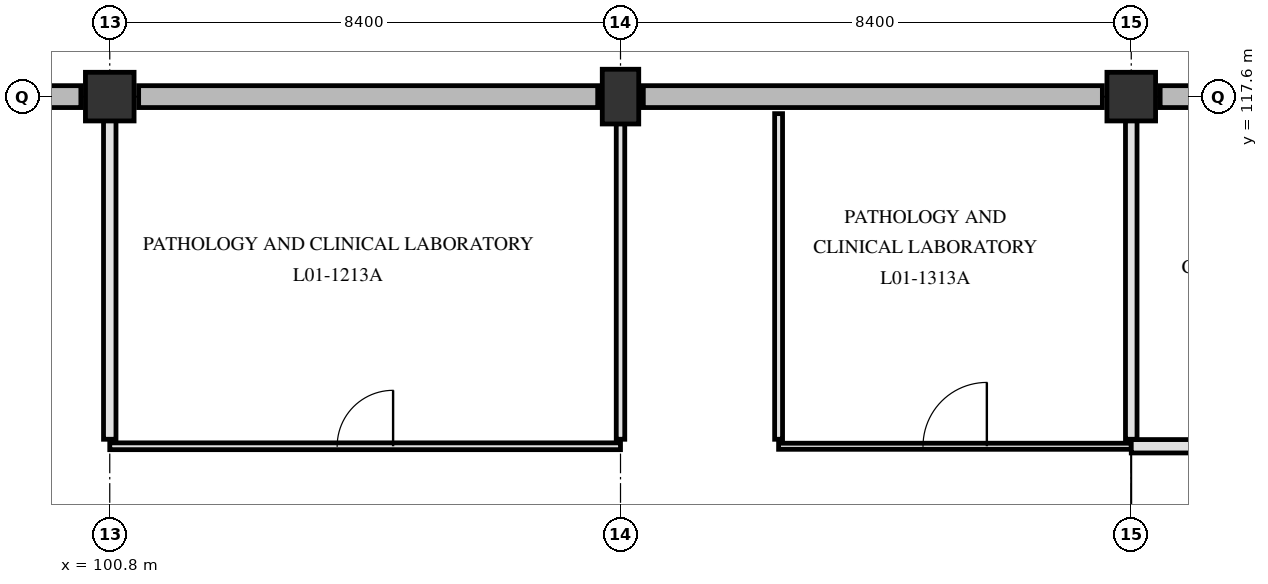
"""IFC4 building model, lengths in metres.
Left out: names, types, materials, properties, quantities, classifications, styles, units other than length and angle.
Written with IfcOpenShell. Run it as: python <this file> out.ifc"""

import sys

from ifc_helpers import new_model, si_unit, direction, frame, frame_2d, origin, origin_2d, place, context, subcontext, project, spatial, rectangle, extrude, element, fill, save


model = new_model("IFC4")
c1 = context("Model", 3, precision=1e-05, world=origin(), true_north=direction((0.0, 1.0)))
c2 = subcontext(c1, "Body", "Model", "MODEL_VIEW")
j1 = project(units=[si_unit("LENGTHUNIT", "METRE"), si_unit("PLANEANGLEUNIT", "RADIAN")], contexts=[c1])
p1 = place(None, origin())
s1 = spatial("IfcSite", under=j1, at=p1, CompositionType="ELEMENT")
p2 = place(p1, origin())
s2 = spatial("IfcBuilding", under=s1, at=p2, CompositionType="ELEMENT")
p3 = place(p2, frame((0.0, 0.0, 4.8)))
s3 = spatial("IfcBuildingStorey", under=s2, at=p3, CompositionType="ELEMENT", Elevation=4.8)
p4 = place(p3, frame((100.8, 117.6, 0.0), z_axis=(0.0, 0.0, 1.0), x_axis=(1.0, 0.0, 0.0)))
e1 = element("IfcColumn", 1, at=p4, inside=s3, PredefinedType="COLUMN", context=c2, shape_type="SweptSolid", body=[
    extrude(rectangle(XDim=0.8, YDim=0.8, at=origin_2d()), origin(), (0.0, 0.0, 1.0), 4.5),
])
p5 = place(p3, frame((109.2, 117.6, 0.0), z_axis=(0.0, 0.0, 1.0), x_axis=(1.0, 0.0, 0.0)))
e2 = element("IfcColumn", 2, at=p5, inside=s3, PredefinedType="PILASTER", context=c2, shape_type="SweptSolid", body=[
    extrude(rectangle(XDim=0.6, YDim=0.9, at=origin_2d()), origin(), (0.0, 0.0, 1.0), 4.5),
])
p6 = place(p3, frame((117.6, 117.6, 0.0), z_axis=(0.0, 0.0, 1.0), x_axis=(1.0, 0.0, 0.0)))
e3 = element("IfcColumn", 3, at=p6, inside=s3, PredefinedType="COLUMN", context=c2, shape_type="SweptSolid", body=[
    extrude(rectangle(XDim=0.8, YDim=0.8, at=origin_2d()), origin(), (0.0, 0.0, 1.0), 4.5),
])
p7 = place(p3, frame((92.875, 117.6, 0.0), z_axis=(0.0, 0.0, 1.0), x_axis=(1.0, 0.0, 0.0)))
e4 = element("IfcWall", 4, at=p7, inside=s3, PredefinedType="SOLIDWALL", context=c2, shape_type="SweptSolid", body=[
    extrude(rectangle(XDim=7.45, YDim=0.36, at=frame_2d((3.725, 0.0))), origin(), (0.0, 0.0, 1.0), 4.15),
])
for number, where, z_axis, x_axis in (
    (5, (101.275, 117.6, 0.0), (0.0, 0.0, 1.0), (1.0, 0.0, 0.0)),
    (6, (109.575, 117.6, 0.0), (0.0, 0.0, 1.0), (1.0, 0.0, 0.0)),
):
    element("IfcWall", number, at=place(p3, frame(where, z_axis=z_axis, x_axis=x_axis)), inside=s3, PredefinedType="SOLIDWALL", context=c2, shape_type="SweptSolid", body=[
        extrude(rectangle(XDim=7.55, YDim=0.36, at=frame_2d((3.775, 0.0))), origin(), (0.0, 0.0, 1.0), 4.15),
    ])
p8 = place(p3, frame((118.075, 117.6, 0.0), z_axis=(0.0, 0.0, 1.0), x_axis=(1.0, 0.0, 0.0)))
e7 = element("IfcWall", 7, at=p8, inside=s3, PredefinedType="SOLIDWALL", context=c2, shape_type="SweptSolid", body=[
    extrude(rectangle(XDim=7.45, YDim=0.36, at=frame_2d((3.725, 0.0))), origin(), (0.0, 0.0, 1.0), 4.15),
])
p9 = place(p3, frame((100.8, 111.85, 0.0), z_axis=(0.0, 0.0, 1.0), x_axis=(1.0, 0.0, 0.0)))
e8 = element("IfcWall", 8, at=p9, inside=s3, PredefinedType="PARTITIONING", context=c2, shape_type="SweptSolid", body=[
    extrude(rectangle(XDim=8.4, YDim=0.112, at=frame_2d((4.2, 0.0))), origin(), (0.0, 0.0, 1.0), 3.59),
])
p10 = place(p9, frame((3.74, 0.0, 0.0)))
e9 = element("IfcOpeningElement", 9, at=p10, cuts=e8, PredefinedType="OPENING", context=c2, shape_type="SweptSolid", body=[
    extrude(rectangle(XDim=0.92, YDim=2.08, at=frame_2d((0.46, 1.04))), frame((0.0, 0.066, 0.0), z_axis=(0.0, -1.0, 0.0), x_axis=(1.0, 0.0, 0.0)), (0.0, 0.0, 1.0), 0.132),
])
p11 = place(p3, frame((111.8, 111.85, 0.0), z_axis=(0.0, 0.0, 1.0), x_axis=(1.0, 0.0, 0.0)))
e10 = element("IfcWall", 10, at=p11, inside=s3, PredefinedType="PARTITIONING", context=c2, shape_type="SweptSolid", body=[
    extrude(rectangle(XDim=5.8, YDim=0.1, at=frame_2d((2.9, 0.0))), origin(), (0.0, 0.0, 1.0), 3.59),
])
p12 = place(p11, frame((2.375, 0.0, 0.0)))
e11 = element("IfcOpeningElement", 11, at=p12, cuts=e10, PredefinedType="OPENING", context=c2, shape_type="SweptSolid", body=[
    extrude(rectangle(XDim=1.05, YDim=2.15, at=frame_2d((0.525, 1.075))), frame((0.0, 0.06, 0.0), z_axis=(0.0, -1.0, 0.0), x_axis=(1.0, 0.0, 0.0)), (0.0, 0.0, 1.0), 0.12),
])
p13 = place(p3, frame((117.6, 111.85, 0.0), z_axis=(0.0, 0.0, 1.0), x_axis=(1.0, 0.0, 0.0)))
e12 = element("IfcWall", 12, at=p13, inside=s3, PredefinedType="PARTITIONING", context=c2, shape_type="SweptSolid", body=[
    extrude(rectangle(XDim=8.4, YDim=0.22, at=frame_2d((4.2, 0.0))), origin(), (0.0, 0.0, 1.0), 3.59),
])
p14 = place(p13, frame((3.74, 0.0, 0.0)))
e13 = element("IfcOpeningElement", 13, at=p14, cuts=e12, PredefinedType="OPENING", context=c2, shape_type="SweptSolid", body=[
    extrude(rectangle(XDim=0.92, YDim=2.08, at=frame_2d((0.46, 1.04))), frame((0.0, 0.12, 0.0), z_axis=(0.0, -1.0, 0.0), x_axis=(1.0, 0.0, 0.0)), (0.0, 0.0, 1.0), 0.24),
])
p15 = place(p3, frame((100.8, 111.965, 0.0), z_axis=(0.0, 0.0, 1.0), x_axis=(0.0, 1.0, 0.0)))
e14 = element("IfcWall", 14, at=p15, inside=s3, PredefinedType="PARTITIONING", context=c2, shape_type="SweptSolid", body=[
    extrude(rectangle(XDim=5.24, YDim=0.205, at=frame_2d((2.62, 0.0))), origin(), (0.0, 0.0, 1.0), 3.59),
])
p16 = place(p3, frame((109.2, 111.965, 0.0), z_axis=(0.0, 0.0, 1.0), x_axis=(0.0, 1.0, 0.0)))
e15 = element("IfcWall", 15, at=p16, inside=s3, PredefinedType="PARTITIONING", context=c2, shape_type="SweptSolid", body=[
    extrude(rectangle(XDim=5.19, YDim=0.14, at=frame_2d((2.595, 0.0))), origin(), (0.0, 0.0, 1.0), 3.59),
])
p17 = place(p3, frame((111.8, 111.965, 0.0), z_axis=(0.0, 0.0, 1.0), x_axis=(0.0, 1.0, 0.0)))
e16 = element("IfcWall", 16, at=p17, inside=s3, PredefinedType="PARTITIONING", context=c2, shape_type="SweptSolid", body=[
    extrude(rectangle(XDim=5.355, YDim=0.13, at=frame_2d((2.677, 0.0))), origin(), (0.0, 0.0, 1.0), 4.14),
])
p18 = place(p3, frame((117.6, 111.965, 0.0), z_axis=(0.0, 0.0, 1.0), x_axis=(0.0, 1.0, 0.0)))
e17 = element("IfcWall", 17, at=p18, inside=s3, PredefinedType="PARTITIONING", context=c2, shape_type="SweptSolid", body=[
    extrude(rectangle(XDim=5.24, YDim=0.19, at=frame_2d((2.62, 0.0))), origin(), (0.0, 0.0, 1.0), 3.59),
])
p19 = place(p10, origin())
e18 = element("IfcDoor", 18, at=p19, inside=s3, OperationType="SINGLE_SWING_RIGHT", PredefinedType="DOOR", context=c2, shape_type="SweptSolid", body=[
    extrude(rectangle(XDim=0.92, YDim=2.08, at=frame_2d((0.46, 1.04))), frame((0.0, 0.025, 0.0), z_axis=(0.0, -1.0, 0.0), x_axis=(1.0, 0.0, 0.0)), (0.0, 0.0, 1.0), 0.05),
])
fill(e9, e18)
p20 = place(p12, origin())
e19 = element("IfcDoor", 19, at=p20, inside=s3, OperationType="SINGLE_SWING_RIGHT", PredefinedType="DOOR", context=c2, shape_type="SweptSolid", body=[
    extrude(rectangle(XDim=1.05, YDim=2.15, at=frame_2d((0.525, 1.075))), frame((0.0, 0.025, 0.0), z_axis=(0.0, -1.0, 0.0), x_axis=(1.0, 0.0, 0.0)), (0.0, 0.0, 1.0), 0.05),
])
fill(e11, e19)
save(model, sys.argv[1])
